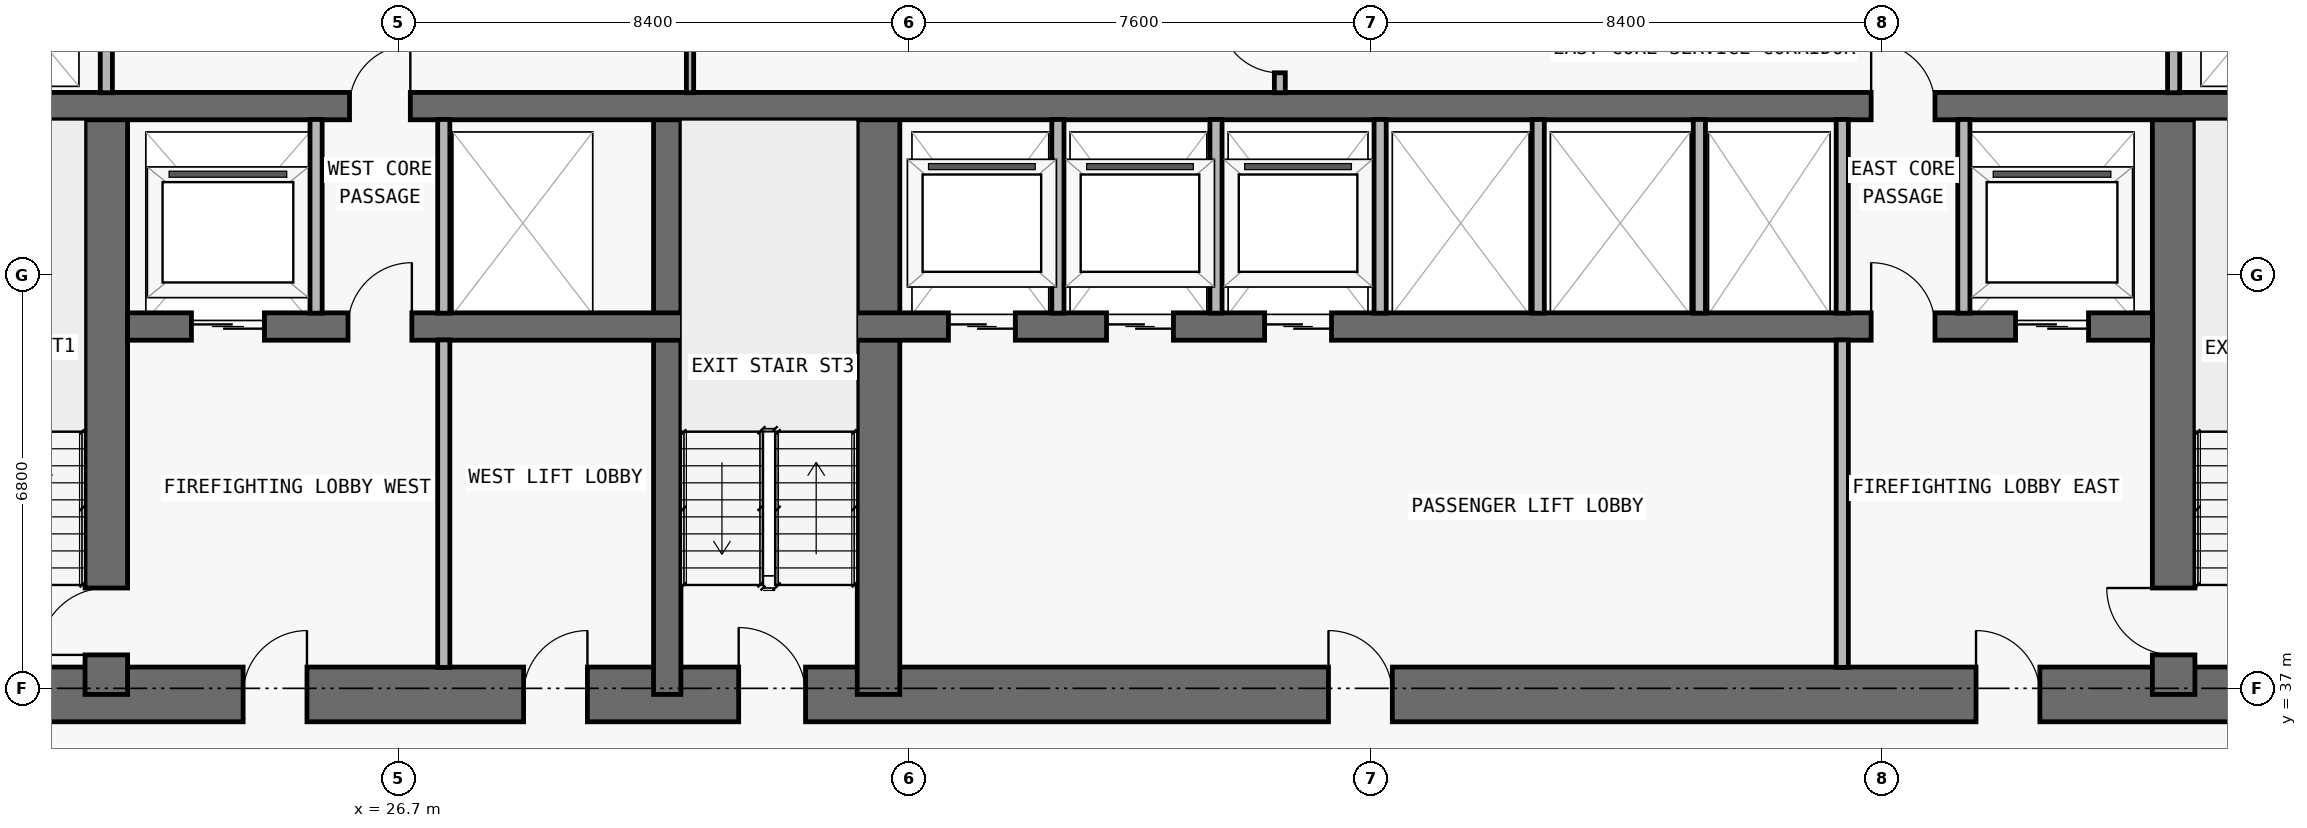
"""IFC4 building model, lengths in metres.
Left out: names, types, materials, properties, quantities, classifications, styles, units other than length and angle.
Written with IfcOpenShell. Run it as: python <this file> out.ifc"""

import sys

from ifc_helpers import new_model, si_unit, direction, frame, frame_2d, origin, place, context, subcontext, project, spatial, rectangle, extrude, element, fill, save


model = new_model("IFC4")
c1 = context("Model", 3, precision=1e-05, world=origin(), true_north=direction((0.0, 1.0)))
c2 = subcontext(c1, "Body", "Model", "MODEL_VIEW")
j1 = project(units=[si_unit("LENGTHUNIT", "METRE"), si_unit("PLANEANGLEUNIT", "RADIAN")], contexts=[c1])
p1 = place(None, origin())
s1 = spatial("IfcSite", under=j1, at=p1, CompositionType="ELEMENT")
p2 = place(p1, origin())
s2 = spatial("IfcBuilding", under=s1, at=p2, CompositionType="ELEMENT")
p3 = place(p2, frame((0.0, 0.0, 56.4)))
s3 = spatial("IfcBuildingStorey", under=s2, at=p3, CompositionType="ELEMENT", Elevation=56.4)
p4 = place(p3, frame((17.75, 36.9, 0.0), z_axis=(0.0, 0.0, 1.0), x_axis=(1.0, 0.0, 0.0)))
e1 = element("IfcWall", 1, at=p4, inside=s3, PredefinedType="SHEAR", context=c2, shape_type="SweptSolid", body=[
    extrude(rectangle(XDim=42.3, YDim=0.9, at=frame_2d((21.15, 0.0))), origin(), (0.0, 0.0, 1.0), 3.05),
])
p5 = place(p4, frame((14.55, 0.0, 0.0)))
e2 = element("IfcOpeningElement", 2, at=p5, cuts=e1, PredefinedType="OPENING", context=c2, shape_type="SweptSolid", body=[
    extrude(rectangle(XDim=1.1, YDim=2.15, at=frame_2d((0.55, 1.075))), frame((0.0, 0.46, 0.0), z_axis=(0.0, -1.0, 0.0), x_axis=(1.0, 0.0, 0.0)), (0.0, 0.0, 1.0), 0.92),
])
p6 = place(p4, frame((6.4, 0.0, 0.0)))
e3 = element("IfcOpeningElement", 3, at=p6, cuts=e1, PredefinedType="OPENING", context=c2, shape_type="SweptSolid", body=[
    extrude(rectangle(XDim=1.05, YDim=2.15, at=frame_2d((0.525, 1.075))), frame((0.0, 0.46, 0.0), z_axis=(0.0, -1.0, 0.0), x_axis=(1.0, 0.0, 0.0)), (0.0, 0.0, 1.0), 0.92),
])
p7 = place(p4, frame((34.9, 0.0, 0.0)))
e4 = element("IfcOpeningElement", 4, at=p7, cuts=e1, PredefinedType="OPENING", context=c2, shape_type="SweptSolid", body=[
    extrude(rectangle(XDim=1.05, YDim=2.15, at=frame_2d((0.525, 1.075))), frame((0.0, 0.46, 0.0), z_axis=(0.0, -1.0, 0.0), x_axis=(1.0, 0.0, 0.0)), (0.0, 0.0, 1.0), 0.92),
])
p8 = place(p4, frame((11.012, 0.0, 0.0)))
e5 = element("IfcOpeningElement", 5, at=p8, cuts=e1, PredefinedType="OPENING", context=c2, shape_type="SweptSolid", body=[
    extrude(rectangle(XDim=1.05, YDim=2.15, at=frame_2d((0.525, 1.075))), frame((0.0, 0.46, 0.0), z_axis=(0.0, -1.0, 0.0), x_axis=(1.0, 0.0, 0.0)), (0.0, 0.0, 1.0), 0.92),
])
p9 = place(p4, frame((24.25, 0.0, 0.0)))
e6 = element("IfcOpeningElement", 6, at=p9, cuts=e1, PredefinedType="OPENING", context=c2, shape_type="SweptSolid", body=[
    extrude(rectangle(XDim=1.05, YDim=2.15, at=frame_2d((0.525, 1.075))), frame((0.0, 0.46, 0.0), z_axis=(0.0, -1.0, 0.0), x_axis=(1.0, 0.0, 0.0)), (0.0, 0.0, 1.0), 0.92),
])
p10 = place(p3, frame((21.9, 36.9, 0.0), z_axis=(0.0, 0.0, 1.0), x_axis=(0.0, 1.0, 0.0)))
e7 = element("IfcWall", 7, at=p10, inside=s3, PredefinedType="SHEAR", context=c2, shape_type="SweptSolid", body=[
    extrude(rectangle(XDim=9.675, YDim=0.7, at=frame_2d((4.837, 0.0))), origin(), (0.0, 0.0, 1.0), 3.05),
])
p11 = place(p10, frame((0.65, 0.0, 0.0)))
e8 = element("IfcOpeningElement", 8, at=p11, cuts=e7, PredefinedType="OPENING", context=c2, shape_type="SweptSolid", body=[
    extrude(rectangle(XDim=1.1, YDim=2.15, at=frame_2d((0.55, 1.075))), frame((0.0, 0.36, 0.0), z_axis=(0.0, -1.0, 0.0), x_axis=(1.0, 0.0, 0.0)), (0.0, 0.0, 1.0), 0.72),
])
p12 = place(p3, frame((55.9, 36.9, 0.0), z_axis=(0.0, 0.0, 1.0), x_axis=(0.0, 1.0, 0.0)))
e9 = element("IfcWall", 9, at=p12, inside=s3, PredefinedType="SHEAR", context=c2, shape_type="SweptSolid", body=[
    extrude(rectangle(XDim=9.675, YDim=0.7, at=frame_2d((4.837, 0.0))), origin(), (0.0, 0.0, 1.0), 3.05),
])
p13 = place(p12, frame((0.65, 0.0, 0.0)))
e10 = element("IfcOpeningElement", 10, at=p13, cuts=e9, PredefinedType="OPENING", context=c2, shape_type="SweptSolid", body=[
    extrude(rectangle(XDim=1.1, YDim=2.15, at=frame_2d((0.55, 1.075))), frame((0.0, 0.36, 0.0), z_axis=(0.0, -1.0, 0.0), x_axis=(1.0, 0.0, 0.0)), (0.0, 0.0, 1.0), 0.72),
])
p14 = place(p3, frame((31.125, 36.9, 0.0), z_axis=(0.0, 0.0, 1.0), x_axis=(0.0, 1.0, 0.0)))
e11 = element("IfcWall", 11, at=p14, inside=s3, PredefinedType="SHEAR", context=c2, shape_type="SweptSolid", body=[
    extrude(rectangle(XDim=9.675, YDim=0.45, at=frame_2d((4.837, 0.0))), origin(), (0.0, 0.0, 1.0), 3.05),
])
p15 = place(p3, frame((34.6, 36.9, 0.0), z_axis=(0.0, 0.0, 1.0), x_axis=(0.0, 1.0, 0.0)))
e12 = element("IfcWall", 12, at=p15, inside=s3, PredefinedType="SHEAR", context=c2, shape_type="SweptSolid", body=[
    extrude(rectangle(XDim=9.675, YDim=0.7, at=frame_2d((4.837, 0.0))), origin(), (0.0, 0.0, 1.0), 3.05),
])
p16 = place(p3, frame((22.25, 42.95, 0.0), z_axis=(0.0, 0.0, 1.0), x_axis=(1.0, 0.0, 0.0)))
e13 = element("IfcWall", 13, at=p16, inside=s3, PredefinedType="SHEAR", context=c2, shape_type="SweptSolid", body=[
    extrude(rectangle(XDim=33.3, YDim=0.45, at=frame_2d((16.65, 0.0))), origin(), (0.0, 0.0, 1.0), 3.05),
])
p17 = place(p16, frame((1.05, 0.0, 0.0)))
e14 = element("IfcOpeningElement", 14, at=p17, cuts=e13, PredefinedType="OPENING", context=c2, shape_type="SweptSolid", body=[
    extrude(rectangle(XDim=1.2, YDim=2.2, at=frame_2d((0.6, 1.1))), frame((0.0, 0.235, 0.0), z_axis=(0.0, -1.0, 0.0), x_axis=(1.0, 0.0, 0.0)), (0.0, 0.0, 1.0), 0.47),
])
p18 = place(p16, frame((31.05, 0.0, 0.0)))
e15 = element("IfcOpeningElement", 15, at=p18, cuts=e13, PredefinedType="OPENING", context=c2, shape_type="SweptSolid", body=[
    extrude(rectangle(XDim=1.2, YDim=2.2, at=frame_2d((0.6, 1.1))), frame((0.0, 0.235, 0.0), z_axis=(0.0, -1.0, 0.0), x_axis=(1.0, 0.0, 0.0)), (0.0, 0.0, 1.0), 0.47),
])
p19 = place(p16, frame((13.5, 0.0, 0.0)))
e16 = element("IfcOpeningElement", 16, at=p19, cuts=e13, PredefinedType="OPENING", context=c2, shape_type="SweptSolid", body=[
    extrude(rectangle(XDim=1.1, YDim=2.2, at=frame_2d((0.55, 1.1))), frame((0.0, 0.235, 0.0), z_axis=(0.0, -1.0, 0.0), x_axis=(1.0, 0.0, 0.0)), (0.0, 0.0, 1.0), 0.47),
])
p20 = place(p16, frame((16.1, 0.0, 0.0)))
e17 = element("IfcOpeningElement", 17, at=p20, cuts=e13, PredefinedType="OPENING", context=c2, shape_type="SweptSolid", body=[
    extrude(rectangle(XDim=1.1, YDim=2.2, at=frame_2d((0.55, 1.1))), frame((0.0, 0.235, 0.0), z_axis=(0.0, -1.0, 0.0), x_axis=(1.0, 0.0, 0.0)), (0.0, 0.0, 1.0), 0.47),
])
p21 = place(p16, frame((18.7, 0.0, 0.0)))
e18 = element("IfcOpeningElement", 18, at=p21, cuts=e13, PredefinedType="OPENING", context=c2, shape_type="SweptSolid", body=[
    extrude(rectangle(XDim=1.1, YDim=2.2, at=frame_2d((0.55, 1.1))), frame((0.0, 0.235, 0.0), z_axis=(0.0, -1.0, 0.0), x_axis=(1.0, 0.0, 0.0)), (0.0, 0.0, 1.0), 0.47),
])
p22 = place(p16, frame((3.625, 0.0, 0.0)))
e19 = element("IfcOpeningElement", 19, at=p22, cuts=e13, PredefinedType="OPENING", context=c2, shape_type="SweptSolid", body=[
    extrude(rectangle(XDim=1.05, YDim=2.15, at=frame_2d((0.525, 1.075))), frame((0.0, 0.235, 0.0), z_axis=(0.0, -1.0, 0.0), x_axis=(1.0, 0.0, 0.0)), (0.0, 0.0, 1.0), 0.47),
])
p23 = place(p16, frame((28.675, 0.0, 0.0)))
e20 = element("IfcOpeningElement", 20, at=p23, cuts=e13, PredefinedType="OPENING", context=c2, shape_type="SweptSolid", body=[
    extrude(rectangle(XDim=1.05, YDim=2.15, at=frame_2d((0.525, 1.075))), frame((0.0, 0.235, 0.0), z_axis=(0.0, -1.0, 0.0), x_axis=(1.0, 0.0, 0.0)), (0.0, 0.0, 1.0), 0.47),
])
p24 = place(p3, frame((18.2, 46.575, 0.0), z_axis=(0.0, 0.0, 1.0), x_axis=(1.0, 0.0, 0.0)))
e21 = element("IfcWall", 21, at=p24, inside=s3, PredefinedType="SHEAR", context=c2, shape_type="SweptSolid", body=[
    extrude(rectangle(XDim=41.4, YDim=0.45, at=frame_2d((20.7, 0.0))), origin(), (0.0, 0.0, 1.0), 3.05),
])
p25 = place(p24, frame((7.7, 0.0, 0.0)))
e22 = element("IfcOpeningElement", 22, at=p25, cuts=e21, PredefinedType="OPENING", context=c2, shape_type="SweptSolid", body=[
    extrude(rectangle(XDim=1.0, YDim=2.2, at=frame_2d((0.5, 1.1))), frame((0.0, 0.235, 0.0), z_axis=(0.0, -1.0, 0.0), x_axis=(1.0, 0.0, 0.0)), (0.0, 0.0, 1.0), 0.47),
])
p26 = place(p24, frame((32.725, 0.0, 0.0)))
e23 = element("IfcOpeningElement", 23, at=p26, cuts=e21, PredefinedType="OPENING", context=c2, shape_type="SweptSolid", body=[
    extrude(rectangle(XDim=1.05, YDim=2.15, at=frame_2d((0.525, 1.075))), frame((0.0, 0.235, 0.0), z_axis=(0.0, -1.0, 0.0), x_axis=(1.0, 0.0, 0.0)), (0.0, 0.0, 1.0), 0.47),
])
p27 = place(p3, frame((21.9, 46.795, 0.0), z_axis=(0.0, 0.0, 1.0), x_axis=(0.0, 1.0, 0.0)))
e24 = element("IfcWall", 24, at=p27, inside=s3, PredefinedType="PARTITIONING", context=c2, shape_type="SweptSolid", body=[
    extrude(rectangle(XDim=3.06, YDim=0.2, at=frame_2d((1.53, 0.0))), origin(), (0.0, 0.0, 1.0), 3.05),
])
p28 = place(p3, frame((25.35, 43.17, 0.0), z_axis=(0.0, 0.0, 1.0), x_axis=(0.0, 1.0, 0.0)))
e25 = element("IfcWall", 25, at=p28, inside=s3, PredefinedType="PARTITIONING", context=c2, shape_type="SweptSolid", body=[
    extrude(rectangle(XDim=3.185, YDim=0.2, at=frame_2d((1.593, 0.0))), origin(), (0.0, 0.0, 1.0), 3.05),
])
p29 = place(p3, frame((27.45, 37.345, 0.0), z_axis=(0.0, 0.0, 1.0), x_axis=(0.0, 1.0, 0.0)))
e26 = element("IfcWall", 26, at=p29, inside=s3, PredefinedType="PARTITIONING", context=c2, shape_type="SweptSolid", body=[
    extrude(rectangle(XDim=5.385, YDim=0.2, at=frame_2d((2.692, 0.0))), origin(), (0.0, 0.0, 1.0), 3.05),
])
p30 = place(p3, frame((27.45, 43.17, 0.0), z_axis=(0.0, 0.0, 1.0), x_axis=(0.0, 1.0, 0.0)))
e27 = element("IfcWall", 27, at=p30, inside=s3, PredefinedType="PARTITIONING", context=c2, shape_type="SweptSolid", body=[
    extrude(rectangle(XDim=3.185, YDim=0.2, at=frame_2d((1.593, 0.0))), origin(), (0.0, 0.0, 1.0), 3.05),
])
p31 = place(p3, frame((31.5, 46.795, 0.0), z_axis=(0.0, 0.0, 1.0), x_axis=(0.0, 1.0, 0.0)))
e28 = element("IfcWall", 28, at=p31, inside=s3, PredefinedType="PARTITIONING", context=c2, shape_type="SweptSolid", body=[
    extrude(rectangle(XDim=3.06, YDim=0.12, at=frame_2d((1.53, 0.0))), origin(), (0.0, 0.0, 1.0), 3.05),
])
for number, where, z_axis, x_axis in (
    (29, (37.55, 43.17, 0.0), (0.0, 0.0, 1.0), (0.0, 1.0, 0.0)),
    (30, (40.15, 43.17, 0.0), (0.0, 0.0, 1.0), (0.0, 1.0, 0.0)),
):
    element("IfcWall", number, at=place(p3, frame(where, z_axis=z_axis, x_axis=x_axis)), inside=s3, PredefinedType="PARTITIONING", context=c2, shape_type="SweptSolid", body=[
        extrude(rectangle(XDim=3.185, YDim=0.2, at=frame_2d((1.593, 0.0))), origin(), (0.0, 0.0, 1.0), 3.05),
    ])
p32 = place(p3, frame((41.2, 46.795, 0.0), z_axis=(0.0, 0.0, 1.0), x_axis=(0.0, 1.0, 0.0)))
e31 = element("IfcWall", 31, at=p32, inside=s3, PredefinedType="PARTITIONING", context=c2, shape_type="SweptSolid", body=[
    extrude(rectangle(XDim=3.06, YDim=0.18, at=frame_2d((1.53, 0.0))), origin(), (0.0, 0.0, 1.0), 3.05),
])
p33 = place(p32, frame((0.327, 0.0, 0.0)))
e32 = element("IfcOpeningElement", 32, at=p33, cuts=e31, PredefinedType="OPENING", context=c2, shape_type="SweptSolid", body=[
    extrude(rectangle(XDim=1.0, YDim=2.2, at=frame_2d((0.5, 1.1))), frame((0.0, 0.1, 0.0), z_axis=(0.0, -1.0, 0.0), x_axis=(1.0, 0.0, 0.0)), (0.0, 0.0, 1.0), 0.2),
])
for number, where, z_axis, x_axis in (
    (33, (42.85, 43.17, 0.0), (0.0, 0.0, 1.0), (0.0, 1.0, 0.0)),
    (34, (45.45, 43.17, 0.0), (0.0, 0.0, 1.0), (0.0, 1.0, 0.0)),
    (35, (48.1, 43.17, 0.0), (0.0, 0.0, 1.0), (0.0, 1.0, 0.0)),
):
    element("IfcWall", number, at=place(p3, frame(where, z_axis=z_axis, x_axis=x_axis)), inside=s3, PredefinedType="PARTITIONING", context=c2, shape_type="SweptSolid", body=[
        extrude(rectangle(XDim=3.185, YDim=0.2, at=frame_2d((1.593, 0.0))), origin(), (0.0, 0.0, 1.0), 3.05),
    ])
p34 = place(p3, frame((50.45, 37.345, 0.0), z_axis=(0.0, 0.0, 1.0), x_axis=(0.0, 1.0, 0.0)))
e36 = element("IfcWall", 36, at=p34, inside=s3, PredefinedType="PARTITIONING", context=c2, shape_type="SweptSolid", body=[
    extrude(rectangle(XDim=5.385, YDim=0.2, at=frame_2d((2.692, 0.0))), origin(), (0.0, 0.0, 1.0), 3.05),
])
for number, where, z_axis, x_axis in (
    (37, (50.45, 43.17, 0.0), (0.0, 0.0, 1.0), (0.0, 1.0, 0.0)),
    (38, (52.45, 43.17, 0.0), (0.0, 0.0, 1.0), (0.0, 1.0, 0.0)),
):
    element("IfcWall", number, at=place(p3, frame(where, z_axis=z_axis, x_axis=x_axis)), inside=s3, PredefinedType="PARTITIONING", context=c2, shape_type="SweptSolid", body=[
        extrude(rectangle(XDim=3.185, YDim=0.2, at=frame_2d((1.593, 0.0))), origin(), (0.0, 0.0, 1.0), 3.05),
    ])
p35 = place(p3, frame((55.9, 46.795, 0.0), z_axis=(0.0, 0.0, 1.0), x_axis=(0.0, 1.0, 0.0)))
e39 = element("IfcWall", 39, at=p35, inside=s3, PredefinedType="PARTITIONING", context=c2, shape_type="SweptSolid", body=[
    extrude(rectangle(XDim=3.06, YDim=0.2, at=frame_2d((1.53, 0.0))), origin(), (0.0, 0.0, 1.0), 3.05),
])
p36 = place(p17, origin())
e40 = element("IfcDoor", 40, at=p36, inside=s3, OperationType="DOUBLE_DOOR_SLIDING", PredefinedType="DOOR", context=c2, shape_type="SweptSolid", body=[
    extrude(rectangle(XDim=1.2, YDim=2.2, at=frame_2d((0.6, 1.1))), frame((0.0, 0.025, 0.0), z_axis=(0.0, -1.0, 0.0), x_axis=(1.0, 0.0, 0.0)), (0.0, 0.0, 1.0), 0.05),
])
fill(e14, e40)
p37 = place(p18, origin())
e41 = element("IfcDoor", 41, at=p37, inside=s3, OperationType="DOUBLE_DOOR_SLIDING", PredefinedType="DOOR", context=c2, shape_type="SweptSolid", body=[
    extrude(rectangle(XDim=1.2, YDim=2.2, at=frame_2d((0.6, 1.1))), frame((0.0, 0.025, 0.0), z_axis=(0.0, -1.0, 0.0), x_axis=(1.0, 0.0, 0.0)), (0.0, 0.0, 1.0), 0.05),
])
fill(e15, e41)
p38 = place(p19, origin())
e42 = element("IfcDoor", 42, at=p38, inside=s3, OperationType="DOUBLE_DOOR_SLIDING", PredefinedType="DOOR", context=c2, shape_type="SweptSolid", body=[
    extrude(rectangle(XDim=1.1, YDim=2.2, at=frame_2d((0.55, 1.1))), frame((0.0, 0.025, 0.0), z_axis=(0.0, -1.0, 0.0), x_axis=(1.0, 0.0, 0.0)), (0.0, 0.0, 1.0), 0.05),
])
fill(e16, e42)
p39 = place(p20, origin())
e43 = element("IfcDoor", 43, at=p39, inside=s3, OperationType="DOUBLE_DOOR_SLIDING", PredefinedType="DOOR", context=c2, shape_type="SweptSolid", body=[
    extrude(rectangle(XDim=1.1, YDim=2.2, at=frame_2d((0.55, 1.1))), frame((0.0, 0.025, 0.0), z_axis=(0.0, -1.0, 0.0), x_axis=(1.0, 0.0, 0.0)), (0.0, 0.0, 1.0), 0.05),
])
fill(e17, e43)
p40 = place(p21, origin())
e44 = element("IfcDoor", 44, at=p40, inside=s3, OperationType="DOUBLE_DOOR_SLIDING", PredefinedType="DOOR", context=c2, shape_type="SweptSolid", body=[
    extrude(rectangle(XDim=1.1, YDim=2.2, at=frame_2d((0.55, 1.1))), frame((0.0, 0.025, 0.0), z_axis=(0.0, -1.0, 0.0), x_axis=(1.0, 0.0, 0.0)), (0.0, 0.0, 1.0), 0.05),
])
fill(e18, e44)
p41 = place(p5, origin())
e45 = element("IfcDoor", 45, at=p41, inside=s3, OperationType="SINGLE_SWING_LEFT", PredefinedType="DOOR", context=c2, shape_type="SweptSolid", body=[
    extrude(rectangle(XDim=1.1, YDim=2.15, at=frame_2d((0.55, 1.075))), frame((0.0, 0.025, 0.0), z_axis=(0.0, -1.0, 0.0), x_axis=(1.0, 0.0, 0.0)), (0.0, 0.0, 1.0), 0.05),
])
fill(e2, e45)
p42 = place(p6, origin())
e46 = element("IfcDoor", 46, at=p42, inside=s3, OperationType="SINGLE_SWING_RIGHT", PredefinedType="DOOR", context=c2, shape_type="SweptSolid", body=[
    extrude(rectangle(XDim=1.05, YDim=2.15, at=frame_2d((0.525, 1.075))), frame((0.0, 0.025, 0.0), z_axis=(0.0, -1.0, 0.0), x_axis=(1.0, 0.0, 0.0)), (0.0, 0.0, 1.0), 0.05),
])
fill(e3, e46)
p43 = place(p11, origin())
e47 = element("IfcDoor", 47, at=p43, inside=s3, OperationType="SINGLE_SWING_LEFT", PredefinedType="DOOR", context=c2, shape_type="SweptSolid", body=[
    extrude(rectangle(XDim=1.1, YDim=2.15, at=frame_2d((0.55, 1.075))), frame((0.0, 0.025, 0.0), z_axis=(0.0, -1.0, 0.0), x_axis=(1.0, 0.0, 0.0)), (0.0, 0.0, 1.0), 0.05),
])
fill(e8, e47)
p44 = place(p22, origin())
e48 = element("IfcDoor", 48, at=p44, inside=s3, OperationType="SINGLE_SWING_RIGHT", PredefinedType="DOOR", context=c2, shape_type="SweptSolid", body=[
    extrude(rectangle(XDim=1.05, YDim=2.15, at=frame_2d((0.525, 1.075))), frame((0.0, 0.025, 0.0), z_axis=(0.0, -1.0, 0.0), x_axis=(1.0, 0.0, 0.0)), (0.0, 0.0, 1.0), 0.05),
])
fill(e19, e48)
p45 = place(p7, origin())
e49 = element("IfcDoor", 49, at=p45, inside=s3, OperationType="SINGLE_SWING_LEFT", PredefinedType="DOOR", context=c2, shape_type="SweptSolid", body=[
    extrude(rectangle(XDim=1.05, YDim=2.15, at=frame_2d((0.525, 1.075))), frame((0.0, 0.025, 0.0), z_axis=(0.0, -1.0, 0.0), x_axis=(1.0, 0.0, 0.0)), (0.0, 0.0, 1.0), 0.05),
])
fill(e4, e49)
p46 = place(p13, origin())
e50 = element("IfcDoor", 50, at=p46, inside=s3, OperationType="SINGLE_SWING_RIGHT", PredefinedType="DOOR", context=c2, shape_type="SweptSolid", body=[
    extrude(rectangle(XDim=1.1, YDim=2.15, at=frame_2d((0.55, 1.075))), frame((0.0, 0.025, 0.0), z_axis=(0.0, -1.0, 0.0), x_axis=(1.0, 0.0, 0.0)), (0.0, 0.0, 1.0), 0.05),
])
fill(e10, e50)
p47 = place(p23, origin())
e51 = element("IfcDoor", 51, at=p47, inside=s3, OperationType="SINGLE_SWING_LEFT", PredefinedType="DOOR", context=c2, shape_type="SweptSolid", body=[
    extrude(rectangle(XDim=1.05, YDim=2.15, at=frame_2d((0.525, 1.075))), frame((0.0, 0.025, 0.0), z_axis=(0.0, -1.0, 0.0), x_axis=(1.0, 0.0, 0.0)), (0.0, 0.0, 1.0), 0.05),
])
fill(e20, e51)
p48 = place(p8, origin())
e52 = element("IfcDoor", 52, at=p48, inside=s3, OperationType="SINGLE_SWING_RIGHT", PredefinedType="DOOR", context=c2, shape_type="SweptSolid", body=[
    extrude(rectangle(XDim=1.05, YDim=2.15, at=frame_2d((0.525, 1.075))), frame((0.0, 0.025, 0.0), z_axis=(0.0, -1.0, 0.0), x_axis=(1.0, 0.0, 0.0)), (0.0, 0.0, 1.0), 0.05),
])
fill(e5, e52)
p49 = place(p9, origin())
e53 = element("IfcDoor", 53, at=p49, inside=s3, OperationType="SINGLE_SWING_LEFT", PredefinedType="DOOR", context=c2, shape_type="SweptSolid", body=[
    extrude(rectangle(XDim=1.05, YDim=2.15, at=frame_2d((0.525, 1.075))), frame((0.0, 0.025, 0.0), z_axis=(0.0, -1.0, 0.0), x_axis=(1.0, 0.0, 0.0)), (0.0, 0.0, 1.0), 0.05),
])
fill(e6, e53)
p50 = place(p25, origin())
e54 = element("IfcDoor", 54, at=p50, inside=s3, OperationType="SINGLE_SWING_RIGHT", PredefinedType="DOOR", context=c2, shape_type="SweptSolid", body=[
    extrude(rectangle(XDim=1.0, YDim=2.2, at=frame_2d((0.5, 1.1))), frame((0.0, 0.025, 0.0), z_axis=(0.0, -1.0, 0.0), x_axis=(1.0, 0.0, 0.0)), (0.0, 0.0, 1.0), 0.05),
])
fill(e22, e54)
p51 = place(p26, origin())
e55 = element("IfcDoor", 55, at=p51, inside=s3, OperationType="SINGLE_SWING_LEFT", PredefinedType="DOOR", context=c2, shape_type="SweptSolid", body=[
    extrude(rectangle(XDim=1.05, YDim=2.15, at=frame_2d((0.525, 1.075))), frame((0.0, 0.025, 0.0), z_axis=(0.0, -1.0, 0.0), x_axis=(1.0, 0.0, 0.0)), (0.0, 0.0, 1.0), 0.05),
])
fill(e23, e55)
p52 = place(p33, origin())
e56 = element("IfcDoor", 56, at=p52, inside=s3, OperationType="SINGLE_SWING_RIGHT", PredefinedType="DOOR", context=c2, shape_type="SweptSolid", body=[
    extrude(rectangle(XDim=1.0, YDim=2.2, at=frame_2d((0.5, 1.1))), frame((0.0, 0.025, 0.0), z_axis=(0.0, -1.0, 0.0), x_axis=(1.0, 0.0, 0.0)), (0.0, 0.0, 1.0), 0.05),
])
fill(e32, e56)
save(model, sys.argv[1])
